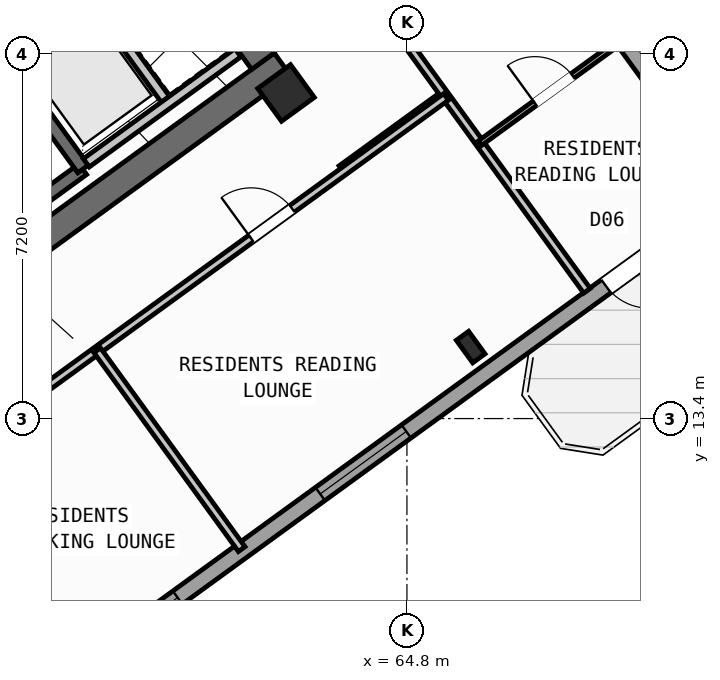
"""IFC4 building model, lengths in metres.
Left out: names, types, materials, properties, quantities, classifications, styles, units other than length and angle.
Written with IfcOpenShell. Run it as: python <this file> out.ifc"""

import sys

from ifc_helpers import new_model, si_unit, direction, frame, frame_2d, origin, origin_2d, place, context, subcontext, project, spatial, rectangle, hollow_rectangle, i_section, extrude, source, transform, mapped, element, fill, save


model = new_model("IFC4")
c1 = context("Model", 3, precision=1e-05, world=origin(), true_north=direction((0.0, 1.0)))
c2 = subcontext(c1, "Body", "Model", "MODEL_VIEW")
j1 = project(units=[si_unit("LENGTHUNIT", "METRE"), si_unit("PLANEANGLEUNIT", "RADIAN")], contexts=[c1])
p1 = place(None, origin())
s1 = spatial("IfcSite", under=j1, at=p1, CompositionType="ELEMENT")
p2 = place(p1, origin())
s2 = spatial("IfcBuilding", under=s1, at=p2, CompositionType="ELEMENT")
p3 = place(p2, frame((0.0, 0.0, 174.9)))
s3 = spatial("IfcBuildingStorey", under=s2, at=p3, CompositionType="ELEMENT", Elevation=174.9)
p4 = place(p3, frame((52.359, 13.14, 0.0), z_axis=(0.0, 0.0, 1.0), x_axis=(0.809014896919, 0.587788139183, 0.0)))
e1 = element("IfcWall", 1, at=p4, inside=s3, PredefinedType="SHEAR", context=c2, shape_type="SweptSolid", body=[
    extrude(rectangle(XDim=12.34, YDim=0.55, at=frame_2d((6.17, 0.0))), origin(), (0.0, 0.0, 1.0), 4.22),
])
p5 = place(p3, frame((61.958, 20.454, 0.0), z_axis=(0.0, 0.0, 1.0), x_axis=(-0.587802113096, 0.809004744015, 0.0)))
e2 = element("IfcWall", 2, at=p5, inside=s3, PredefinedType="SHEAR", context=c2, shape_type="SweptSolid", body=[
    extrude(rectangle(XDim=3.575, YDim=0.55, at=frame_2d((1.788, 0.0))), origin(), (0.0, 0.0, 1.0), 4.22),
])
m1 = source(origin(), c2, "Body", "SweptSolid", [
    extrude(i_section(OverallWidth=0.3, OverallDepth=0.55, WebThickness=0.015, FlangeThickness=0.029, at=origin_2d()), origin(), (0.0, 0.0, 1.0), 4.5),
])
p6 = place(p3, frame((66.058, 14.811, 0.0), z_axis=(0.0, 0.0, 1.0), x_axis=(0.809016994375, 0.587785252292, 0.0)))
e3 = element("IfcColumn", 3, at=p6, inside=s3, PredefinedType="COLUMN", context=c2, shape_type="MappedRepresentation", body=[
    mapped(m1, transform((0.0, 0.0, 0.0), scale=1.0)),
])
m2 = source(origin(), c2, "Body", "SweptSolid", [
    extrude(hollow_rectangle(XDim=0.8, YDim=0.8, WallThickness=0.032, at=origin_2d()), origin(), (0.0, 0.0, 1.0), 4.5),
])
p7 = place(p3, frame((62.414, 19.827, 0.0), z_axis=(0.0, 0.0, 1.0), x_axis=(0.809016994375, 0.587785252292, 0.0)))
e4 = element("IfcColumn", 4, at=p7, inside=s3, PredefinedType="COLUMN", context=c2, shape_type="MappedRepresentation", body=[
    mapped(m2, transform((0.0, 0.0, 0.0), scale=1.0)),
])
p8 = place(p3, frame((58.455, 35.484, 0.0), z_axis=(0.0, 0.0, 1.0), x_axis=(0.587783625747, -0.809018176127, 0.0)))
e5 = element("IfcWall", 5, at=p8, inside=s3, PredefinedType="STANDARD", context=c2, shape_type="SweptSolid", body=[
    extrude(rectangle(XDim=21.587, YDim=0.32, at=frame_2d((10.794, 0.0))), origin(), (0.0, 0.0, 1.0), 2.395),
])
p9 = place(p8, frame((1.807, 0.0, 1.0)))
e6 = element("IfcOpeningElement", 6, at=p9, cuts=e5, PredefinedType="OPENING", context=c2, shape_type="SweptSolid", body=[
    extrude(rectangle(XDim=0.9, YDim=1.25, at=frame_2d((0.45, 0.625))), frame((0.0, 0.17, 0.0), z_axis=(0.0, -1.0, 0.0), x_axis=(1.0, 0.0, 0.0)), (0.0, 0.0, 1.0), 0.34),
])
p10 = place(p8, frame((5.195, 0.0, 1.0)))
e7 = element("IfcOpeningElement", 7, at=p10, cuts=e5, PredefinedType="OPENING", context=c2, shape_type="SweptSolid", body=[
    extrude(rectangle(XDim=0.9, YDim=1.25, at=frame_2d((0.45, 0.625))), frame((0.0, 0.17, 0.0), z_axis=(0.0, -1.0, 0.0), x_axis=(1.0, 0.0, 0.0)), (0.0, 0.0, 1.0), 0.34),
])
p11 = place(p8, frame((13.059, 0.0, 1.0)))
e8 = element("IfcOpeningElement", 8, at=p11, cuts=e5, PredefinedType="OPENING", context=c2, shape_type="SweptSolid", body=[
    extrude(rectangle(XDim=0.9, YDim=1.25, at=frame_2d((0.45, 0.625))), frame((0.0, 0.17, 0.0), z_axis=(0.0, -1.0, 0.0), x_axis=(1.0, 0.0, 0.0)), (0.0, 0.0, 1.0), 0.34),
])
p12 = place(p3, frame((71.098, 17.731, 0.0), z_axis=(0.0, 0.0, 1.0), x_axis=(-0.809021120468, -0.587779573171, 0.0)))
e9 = element("IfcWall", 9, at=p12, inside=s3, PredefinedType="STANDARD", context=c2, shape_type="SweptSolid", body=[
    extrude(rectangle(XDim=17.588, YDim=0.32, at=frame_2d((8.794, 0.0))), origin(), (0.0, 0.0, 1.0), 4.22),
])
p13 = place(p12, frame((1.875, 0.0, 0.0)))
e10 = element("IfcOpeningElement", 10, at=p13, cuts=e9, PredefinedType="OPENING", context=c2, shape_type="SweptSolid", body=[
    extrude(rectangle(XDim=1.05, YDim=2.15, at=frame_2d((0.525, 1.075))), frame((0.0, 0.17, 0.0), z_axis=(0.0, -1.0, 0.0), x_axis=(1.0, 0.0, 0.0)), (0.0, 0.0, 1.0), 0.34),
])
p14 = place(p12, frame((7.801, 0.0, 0.8)))
e11 = element("IfcOpeningElement", 11, at=p14, cuts=e9, PredefinedType="OPENING", context=c2, shape_type="SweptSolid", body=[
    extrude(rectangle(XDim=2.1, YDim=1.55, at=frame_2d((1.05, 0.775))), frame((0.0, 0.17, 0.0), z_axis=(0.0, -1.0, 0.0), x_axis=(1.0, 0.0, 0.0)), (0.0, 0.0, 1.0), 0.34),
])
p15 = place(p12, frame((13.379, 0.0, 0.85)))
e12 = element("IfcOpeningElement", 12, at=p15, cuts=e9, PredefinedType="OPENING", context=c2, shape_type="SweptSolid", body=[
    extrude(rectangle(XDim=1.8, YDim=1.5, at=frame_2d((0.9, 0.75))), frame((0.0, 0.17, 0.0), z_axis=(0.0, -1.0, 0.0), x_axis=(1.0, 0.0, 0.0)), (0.0, 0.0, 1.0), 0.34),
])
p16 = place(p3, frame((52.472, 14.013, 0.0), z_axis=(0.0, 0.0, 1.0), x_axis=(0.809028366311, 0.587769599847, 0.0)))
e13 = element("IfcWall", 13, at=p16, inside=s3, PredefinedType="SHEAR", context=c2, shape_type="SweptSolid", body=[
    extrude(rectangle(XDim=7.33, YDim=0.26, at=frame_2d((3.665, 0.0))), origin(), (0.0, 0.0, 1.0), 4.22),
])
p17 = place(p3, frame((58.41, 18.327, 0.0), z_axis=(0.0, 0.0, 1.0), x_axis=(-0.58776738483, 0.809029975545, 0.0)))
e14 = element("IfcWall", 14, at=p17, inside=s3, PredefinedType="SHEAR", context=c2, shape_type="SweptSolid", body=[
    extrude(rectangle(XDim=3.16, YDim=0.26, at=frame_2d((1.58, 0.0))), origin(), (0.0, 0.0, 1.0), 4.22),
])
p18 = place(p3, frame((60.067, 19.655, 0.0), z_axis=(0.0, 0.0, 1.0), x_axis=(-0.587800520745, 0.809005900975, 0.0)))
e15 = element("IfcWall", 15, at=p18, inside=s3, PredefinedType="STANDARD", context=c2, shape_type="SweptSolid", body=[
    extrude(rectangle(XDim=2.66, YDim=0.2, at=frame_2d((1.33, 0.0))), origin(), (0.0, 0.0, 1.0), 4.21),
])
p19 = place(p3, frame((58.472, 18.447, 0.0), z_axis=(0.0, 0.0, 1.0), x_axis=(0.809018631237, 0.587782999339, 0.0)))
e16 = element("IfcWall", 16, at=p19, inside=s3, PredefinedType="STANDARD", context=c2, shape_type="SweptSolid", body=[
    extrude(rectangle(XDim=3.698, YDim=0.2, at=frame_2d((1.849, 0.0))), origin(), (0.0, 0.0, 1.0), 4.21),
])
p20 = place(p3, frame((63.507, 18.322, 0.0), z_axis=(0.0, 0.0, 1.0), x_axis=(0.809034604122, 0.587761013791, 0.0)))
e17 = element("IfcWall", 17, at=p20, inside=s3, PredefinedType="PARTITIONING", context=c2, shape_type="SweptSolid", body=[
    extrude(rectangle(XDim=2.51, YDim=0.16, at=frame_2d((1.255, 0.0))), origin(), (0.0, 0.0, 1.0), 4.21),
])
p21 = place(p3, frame((68.353, 15.922, 0.0), z_axis=(0.0, 0.0, 1.0), x_axis=(-0.587784007866, 0.809017898502, 0.0)))
e18 = element("IfcWall", 18, at=p21, inside=s3, PredefinedType="PARTITIONING", context=c2, shape_type="SweptSolid", body=[
    extrude(rectangle(XDim=9.4, YDim=0.16, at=frame_2d((4.7, 0.0))), origin(), (0.0, 0.0, 1.0), 4.21),
])
p22 = place(p3, frame((66.238, 18.833, 0.0), z_axis=(0.0, 0.0, 1.0), x_axis=(0.809013833588, 0.587789602718, 0.0)))
e19 = element("IfcWall", 19, at=p22, inside=s3, PredefinedType="PARTITIONING", context=c2, shape_type="SweptSolid", body=[
    extrude(rectangle(XDim=3.61, YDim=0.11, at=frame_2d((1.805, 0.0))), origin(), (0.0, 0.0, 1.0), 4.21),
])
p23 = place(p22, frame((1.345, 0.0, 0.0)))
e20 = element("IfcOpeningElement", 20, at=p23, cuts=e19, PredefinedType="OPENING", context=c2, shape_type="SweptSolid", body=[
    extrude(rectangle(XDim=0.92, YDim=2.08, at=frame_2d((0.46, 1.04))), frame((0.0, 0.065, 0.0), z_axis=(0.0, -1.0, 0.0), x_axis=(1.0, 0.0, 0.0)), (0.0, 0.0, 1.0), 0.13),
])
p24 = place(p3, frame((53.705, 11.126, 0.0), z_axis=(0.0, 0.0, 1.0), x_axis=(0.809014504436, 0.587788679384, 0.0)))
e21 = element("IfcWall", 21, at=p24, inside=s3, PredefinedType="PARTITIONING", context=c2, shape_type="SweptSolid", body=[
    extrude(rectangle(XDim=14.67, YDim=0.16, at=frame_2d((7.335, 0.0))), origin(), (0.0, 0.0, 1.0), 4.21),
])
p25 = place(p24, frame((3.215, 0.0, 0.0)))
e22 = element("IfcOpeningElement", 22, at=p25, cuts=e21, PredefinedType="OPENING", context=c2, shape_type="SweptSolid", body=[
    extrude(rectangle(XDim=1.0, YDim=2.1, at=frame_2d((0.5, 1.05))), frame((0.0, 0.09, 0.0), z_axis=(0.0, -1.0, 0.0), x_axis=(1.0, 0.0, 0.0)), (0.0, 0.0, 1.0), 0.18),
])
p26 = place(p24, frame((9.915, 0.0, 0.0)))
e23 = element("IfcOpeningElement", 23, at=p26, cuts=e21, PredefinedType="OPENING", context=c2, shape_type="SweptSolid", body=[
    extrude(rectangle(XDim=1.0, YDim=2.1, at=frame_2d((0.5, 1.05))), frame((0.0, 0.09, 0.0), z_axis=(0.0, -1.0, 0.0), x_axis=(1.0, 0.0, 0.0)), (0.0, 0.0, 1.0), 0.18),
])
p27 = place(p3, frame((57.747, 7.586, 0.0), z_axis=(0.0, 0.0, 1.0), x_axis=(-0.587784893399, 0.809017255126, 0.0)))
e24 = element("IfcWall", 24, at=p27, inside=s3, PredefinedType="PARTITIONING", context=c2, shape_type="SweptSolid", body=[
    extrude(rectangle(XDim=5.48, YDim=0.16, at=frame_2d((2.74, 0.0))), origin(), (0.0, 0.0, 1.0), 4.21),
])
p28 = place(p3, frame((61.539, 10.823, 0.0), z_axis=(0.0, 0.0, 1.0), x_axis=(-0.587785532001, 0.809016791155, 0.0)))
e25 = element("IfcWall", 25, at=p28, inside=s3, PredefinedType="PARTITIONING", context=c2, shape_type="SweptSolid", body=[
    extrude(rectangle(XDim=4.85, YDim=0.16, at=frame_2d((2.425, 0.0))), origin(), (0.0, 0.0, 1.0), 4.21),
])
m3 = source(origin(), c2, "Body", "SweptSolid", [
    extrude(rectangle(XDim=1.05, YDim=2.15, at=frame_2d((0.525, 1.075))), frame((0.0, 0.025, 0.0), z_axis=(0.0, -1.0, 0.0), x_axis=(1.0, 0.0, 0.0)), (0.0, 0.0, 1.0), 0.05),
])
p29 = place(p13, origin())
e26 = element("IfcDoor", 26, at=p29, inside=s3, OperationType="SINGLE_SWING_LEFT", PredefinedType="DOOR", context=c2, shape_type="MappedRepresentation", body=[
    mapped(m3, transform((0.0, 0.0, 0.0), scale=1.0)),
])
fill(e10, e26)
m4 = source(origin(), c2, "Body", "SweptSolid", [
    extrude(rectangle(XDim=2.1, YDim=1.55, at=frame_2d((1.05, 0.775))), frame((0.0, 0.03, 0.0), z_axis=(0.0, -1.0, 0.0), x_axis=(1.0, 0.0, 0.0)), (0.0, 0.0, 1.0), 0.06),
])
p30 = place(p14, origin())
e27 = element("IfcWindow", 27, at=p30, inside=s3, PartitioningType="SINGLE_PANEL", PredefinedType="WINDOW", context=c2, shape_type="MappedRepresentation", body=[
    mapped(m4, transform((0.0, 0.0, 0.0), scale=1.0)),
])
fill(e11, e27)
m5 = source(origin(), c2, "Body", "SweptSolid", [
    extrude(rectangle(XDim=1.8, YDim=1.5, at=frame_2d((0.9, 0.75))), frame((0.0, 0.03, 0.0), z_axis=(0.0, -1.0, 0.0), x_axis=(1.0, 0.0, 0.0)), (0.0, 0.0, 1.0), 0.06),
])
p31 = place(p15, origin())
e28 = element("IfcWindow", 28, at=p31, inside=s3, PartitioningType="SINGLE_PANEL", PredefinedType="WINDOW", context=c2, shape_type="MappedRepresentation", body=[
    mapped(m5, transform((0.0, 0.0, 0.0), scale=1.0)),
])
fill(e12, e28)
m6 = source(origin(), c2, "Body", "SweptSolid", [
    extrude(rectangle(XDim=0.92, YDim=2.08, at=frame_2d((0.46, 1.04))), frame((0.0, 0.025, 0.0), z_axis=(0.0, -1.0, 0.0), x_axis=(1.0, 0.0, 0.0)), (0.0, 0.0, 1.0), 0.05),
])
p32 = place(p23, origin())
e29 = element("IfcDoor", 29, at=p32, inside=s3, OperationType="SINGLE_SWING_LEFT", PredefinedType="DOOR", context=c2, shape_type="MappedRepresentation", body=[
    mapped(m6, transform((0.0, 0.0, 0.0), scale=1.0)),
])
fill(e20, e29)
m7 = source(origin(), c2, "Body", "SweptSolid", [
    extrude(rectangle(XDim=1.0, YDim=2.1, at=frame_2d((0.5, 1.05))), frame((0.0, 0.025, 0.0), z_axis=(0.0, -1.0, 0.0), x_axis=(1.0, 0.0, 0.0)), (0.0, 0.0, 1.0), 0.05),
])
p33 = place(p26, origin())
e30 = element("IfcDoor", 30, at=p33, inside=s3, OperationType="SINGLE_SWING_LEFT", PredefinedType="DOOR", context=c2, shape_type="MappedRepresentation", body=[
    mapped(m7, transform((0.0, 0.0, 0.0), scale=1.0)),
])
fill(e23, e30)
save(model, sys.argv[1])
